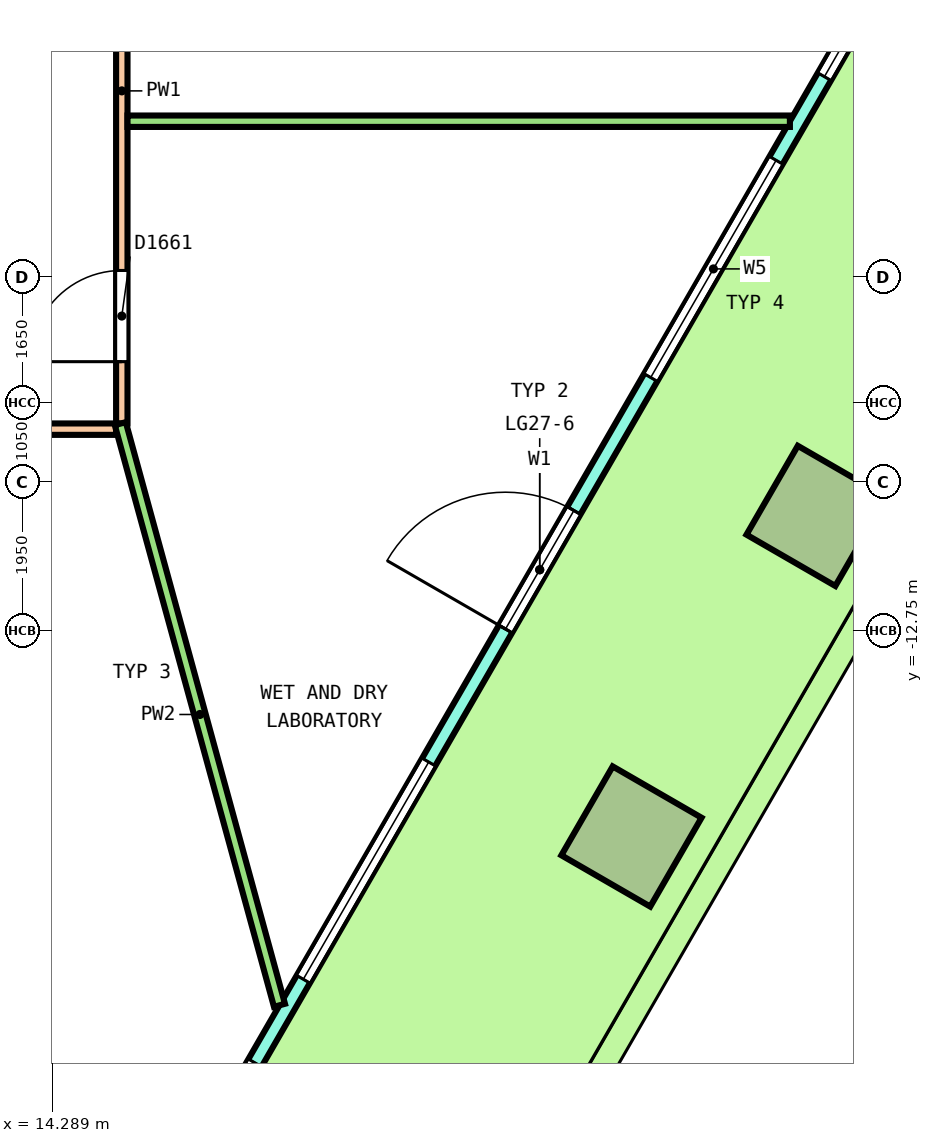
"""IFC4 building model, lengths in metres.
Left out: names, types, materials, properties, quantities, classifications, styles, units other than length and angle.
Written with IfcOpenShell. Run it as: python <this file> out.ifc"""

import sys

from ifc_helpers import new_model, si_unit, direction, frame, frame_2d, origin, origin_2d, place, context, subcontext, project, spatial, polyline, rectangle, outline, extrude, element, fill, save


model = new_model("IFC4")
c1 = context("Model", 3, precision=1e-05, world=origin(), true_north=direction((0.0, 1.0)))
c2 = subcontext(c1, "Body", "Model", "MODEL_VIEW")
j1 = project(units=[si_unit("LENGTHUNIT", "METRE"), si_unit("PLANEANGLEUNIT", "RADIAN")], contexts=[c1])
p1 = place(None, origin())
s1 = spatial("IfcSite", under=j1, at=p1, CompositionType="ELEMENT")
p2 = place(p1, origin())
s2 = spatial("IfcBuilding", under=s1, at=p2, CompositionType="ELEMENT")
p3 = place(p2, frame((0.0, 0.0, 126.4)))
s3 = spatial("IfcBuildingStorey", under=s2, at=p3, CompositionType="ELEMENT", Elevation=126.4)
for number, where, z_axis, x_axis in (
    (1, (21.905, -15.459, 0.0), (0.0, 0.0, 1.0), (0.5, 0.866, 0.0)),
    (2, (24.341, -11.241, 0.0), (0.0, 0.0, 1.0), (0.5, 0.866, 0.0)),
):
    element("IfcColumn", number, at=place(p3, frame(where, z_axis=z_axis, x_axis=x_axis)), inside=s3, PredefinedType="COLUMN", context=c2, shape_type="SweptSolid", body=[
        extrude(rectangle(XDim=1.35, YDim=1.35, at=origin_2d()), origin(), (0.0, 0.0, 1.0), 4.05),
    ])
p4 = place(p3, frame((14.985, -21.845, 0.0), z_axis=(0.0, 0.0, 1.0), x_axis=(0.50000204422, 0.86602422355, 0.0)))
e3 = element("IfcWall", 3, at=p4, inside=s3, PredefinedType="SOLIDWALL", context=c2, shape_type="SweptSolid", body=[
    extrude(outline(polyline([(-0.027, -0.1), (1.014, -0.1), (2.055, -0.1), (3.097, -0.1), (4.138, -0.1), (5.179, -0.1), (6.22, -0.1), (7.261, -0.1), (8.303, -0.1), (9.344, -0.1), (10.385, -0.1), (11.426, -0.1), (12.468, -0.1), (13.509, -0.1), (14.55, -0.1), (15.591, -0.1), (16.632, -0.1), (17.673, -0.1), (18.715, -0.1), (19.756, -0.1), (20.797, -0.1), (21.838, -0.1), (22.879, -0.1), (22.826, 0.1), (21.789, 0.1), (20.753, 0.1), (19.717, 0.1), (18.68, 0.1), (17.644, 0.1), (16.608, 0.1), (15.572, 0.1), (14.535, 0.1), (13.499, 0.1), (12.463, 0.1), (11.426, 0.1), (10.39, 0.1), (9.354, 0.1), (8.317, 0.1), (7.281, 0.1), (6.245, 0.1), (5.208, 0.1), (4.172, 0.1), (3.136, 0.1), (2.099, 0.1), (1.063, 0.1), (0.027, 0.1), (-0.027, -0.1)])), origin(), (0.0, 0.0, 1.0), 4.1),
])
p5 = place(p4, frame((0.635, 0.0, 0.1)))
e4 = element("IfcOpeningElement", 4, at=p5, cuts=e3, PredefinedType="OPENING", context=c2, shape_type="SweptSolid", body=[
    extrude(rectangle(XDim=3.3, YDim=2.9, at=frame_2d((1.65, 1.45))), frame((0.0, 0.11, 0.0), z_axis=(0.0, -1.0, 0.0), x_axis=(1.0, 0.0, 0.0)), (0.0, 0.0, 1.0), 0.22),
])
p6 = place(p4, frame((5.206, 0.0, 0.1)))
e5 = element("IfcOpeningElement", 5, at=p6, cuts=e3, PredefinedType="OPENING", context=c2, shape_type="SweptSolid", body=[
    extrude(rectangle(XDim=3.3, YDim=2.9, at=frame_2d((1.65, 1.45))), frame((0.0, 0.11, 0.0), z_axis=(0.0, -1.0, 0.0), x_axis=(1.0, 0.0, 0.0)), (0.0, 0.0, 1.0), 0.22),
])
p7 = place(p4, frame((10.526, 0.0, 0.0)))
e6 = element("IfcOpeningElement", 6, at=p7, cuts=e3, PredefinedType="OPENING", context=c2, shape_type="SweptSolid", body=[
    extrude(rectangle(XDim=1.8, YDim=2.4, at=frame_2d((0.9, 1.2))), frame((0.0, 0.11, 0.0), z_axis=(0.0, -1.0, 0.0), x_axis=(1.0, 0.0, 0.0)), (0.0, 0.0, 1.0), 0.22),
])
p8 = place(p4, frame((10.526, 0.0, 2.55)))
e7 = element("IfcOpeningElement", 7, at=p8, cuts=e3, PredefinedType="OPENING", context=c2, shape_type="SweptSolid", body=[
    extrude(rectangle(XDim=1.8, YDim=0.45, at=frame_2d((0.9, 0.225))), frame((0.0, 0.11, 0.0), z_axis=(0.0, -1.0, 0.0), x_axis=(1.0, 0.0, 0.0)), (0.0, 0.0, 1.0), 0.22),
])
p9 = place(p4, frame((14.347, 0.0, 0.1)))
e8 = element("IfcOpeningElement", 8, at=p9, cuts=e3, PredefinedType="OPENING", context=c2, shape_type="SweptSolid", body=[
    extrude(rectangle(XDim=3.3, YDim=2.9, at=frame_2d((1.65, 1.45))), frame((0.0, 0.11, 0.0), z_axis=(0.0, -1.0, 0.0), x_axis=(1.0, 0.0, 0.0)), (0.0, 0.0, 1.0), 0.22),
])
p10 = place(p4, frame((18.917, 0.0, 0.1)))
e9 = element("IfcOpeningElement", 9, at=p10, cuts=e3, PredefinedType="OPENING", context=c2, shape_type="SweptSolid", body=[
    extrude(rectangle(XDim=3.3, YDim=2.9, at=frame_2d((1.65, 1.45))), frame((0.0, 0.11, 0.0), z_axis=(0.0, -1.0, 0.0), x_axis=(1.0, 0.0, 0.0)), (0.0, 0.0, 1.0), 0.22),
])
p11 = place(p3, frame((15.2, -10.025, 0.0), z_axis=(0.0, 0.0, 1.0), x_axis=(0.0, 1.0, 0.0)))
e10 = element("IfcWall", 10, at=p11, inside=s3, PredefinedType="PARTITIONING", context=c2, shape_type="SweptSolid", body=[
    extrude(rectangle(XDim=8.75, YDim=0.15, at=frame_2d((4.375, 0.0))), origin(), (0.0, 0.0, 1.0), 3.05),
])
p12 = place(p11, frame((0.813, 0.0, 0.0)))
e11 = element("IfcOpeningElement", 11, at=p12, cuts=e10, PredefinedType="OPENING", context=c2, shape_type="SweptSolid", body=[
    extrude(rectangle(XDim=1.2, YDim=2.1, at=frame_2d((0.6, 1.05))), frame((0.0, 0.085, 0.0), z_axis=(0.0, -1.0, 0.0), x_axis=(1.0, 0.0, 0.0)), (0.0, 0.0, 1.0), 0.17),
])
p13 = place(p3, frame((-15.275, -10.1, 0.0), z_axis=(0.0, 0.0, 1.0), x_axis=(1.0, 0.0, 0.0)))
e12 = element("IfcWall", 12, at=p13, inside=s3, PredefinedType="PARTITIONING", context=c2, shape_type="SweptSolid", body=[
    extrude(rectangle(XDim=30.4, YDim=0.15, at=frame_2d((15.2, 0.0))), origin(), (0.0, 0.0, 1.0), 3.05),
])
p14 = place(p13, frame((1.506, 0.0, 0.0)))
e13 = element("IfcOpeningElement", 13, at=p14, cuts=e12, PredefinedType="OPENING", context=c2, shape_type="SweptSolid", body=[
    extrude(rectangle(XDim=1.0, YDim=2.1, at=frame_2d((0.5, 1.05))), frame((0.0, 0.085, 0.0), z_axis=(0.0, -1.0, 0.0), x_axis=(1.0, 0.0, 0.0)), (0.0, 0.0, 1.0), 0.17),
])
p15 = place(p13, frame((7.84, 0.0, 0.0)))
e14 = element("IfcOpeningElement", 14, at=p15, cuts=e12, PredefinedType="OPENING", context=c2, shape_type="SweptSolid", body=[
    extrude(rectangle(XDim=1.0, YDim=2.1, at=frame_2d((0.5, 1.05))), frame((0.0, 0.085, 0.0), z_axis=(0.0, -1.0, 0.0), x_axis=(1.0, 0.0, 0.0)), (0.0, 0.0, 1.0), 0.17),
])
p16 = place(p13, frame((15.685, 0.0, 0.0)))
e15 = element("IfcOpeningElement", 15, at=p16, cuts=e12, PredefinedType="OPENING", context=c2, shape_type="SweptSolid", body=[
    extrude(rectangle(XDim=1.2, YDim=2.1, at=frame_2d((0.6, 1.05))), frame((0.0, 0.085, 0.0), z_axis=(0.0, -1.0, 0.0), x_axis=(1.0, 0.0, 0.0)), (0.0, 0.0, 1.0), 0.17),
])
p17 = place(p13, frame((23.812, 0.0, 0.0)))
e16 = element("IfcOpeningElement", 16, at=p17, cuts=e12, PredefinedType="OPENING", context=c2, shape_type="SweptSolid", body=[
    extrude(rectangle(XDim=1.2, YDim=2.1, at=frame_2d((0.6, 1.05))), frame((0.0, 0.085, 0.0), z_axis=(0.0, -1.0, 0.0), x_axis=(1.0, 0.0, 0.0)), (0.0, 0.0, 1.0), 0.17),
])
p18 = place(p3, frame((15.18, -10.028, 0.0), z_axis=(0.0, 0.0, 1.0), x_axis=(0.263973985393, -0.964529799973, 0.0)))
e17 = element("IfcWall", 17, at=p18, inside=s3, PredefinedType="PARTITIONING", context=c2, shape_type="SweptSolid", body=[
    extrude(rectangle(XDim=7.934, YDim=0.15, at=frame_2d((3.967, 0.0))), origin(), (0.0, 0.0, 1.0), 3.05),
])
p19 = place(p3, frame((15.275, -6.049, 0.0), z_axis=(0.0, 0.0, 1.0), x_axis=(1.0, 0.0, 0.0)))
e18 = element("IfcWall", 18, at=p19, inside=s3, PredefinedType="PARTITIONING", context=c2, shape_type="SweptSolid", body=[
    extrude(rectangle(XDim=8.715, YDim=0.15, at=frame_2d((4.357, 0.0))), origin(), (0.0, 0.0, 1.0), 3.05),
])
p20 = place(p5, origin())
e19 = element("IfcWindow", 19, at=p20, inside=s3, PartitioningType="SINGLE_PANEL", PredefinedType="WINDOW", context=c2, shape_type="SweptSolid", body=[
    extrude(rectangle(XDim=3.3, YDim=2.9, at=frame_2d((1.65, 1.45))), frame((0.0, 0.03, 0.0), z_axis=(0.0, -1.0, 0.0), x_axis=(1.0, 0.0, 0.0)), (0.0, 0.0, 1.0), 0.06),
])
fill(e4, e19)
p21 = place(p6, origin())
e20 = element("IfcWindow", 20, at=p21, inside=s3, PartitioningType="SINGLE_PANEL", PredefinedType="WINDOW", context=c2, shape_type="SweptSolid", body=[
    extrude(rectangle(XDim=3.3, YDim=2.9, at=frame_2d((1.65, 1.45))), frame((0.0, 0.03, 0.0), z_axis=(0.0, -1.0, 0.0), x_axis=(1.0, 0.0, 0.0)), (0.0, 0.0, 1.0), 0.06),
])
fill(e5, e20)
p22 = place(p7, origin())
e21 = element("IfcDoor", 21, at=p22, inside=s3, OperationType="DOUBLE_DOOR_SINGLE_SWING", PredefinedType="DOOR", context=c2, shape_type="SweptSolid", body=[
    extrude(rectangle(XDim=1.8, YDim=2.4, at=frame_2d((0.9, 1.2))), frame((0.0, 0.025, 0.0), z_axis=(0.0, -1.0, 0.0), x_axis=(1.0, 0.0, 0.0)), (0.0, 0.0, 1.0), 0.05),
])
fill(e6, e21)
p23 = place(p8, origin())
e22 = element("IfcWindow", 22, at=p23, inside=s3, PartitioningType="SINGLE_PANEL", PredefinedType="WINDOW", context=c2, shape_type="SweptSolid", body=[
    extrude(rectangle(XDim=1.8, YDim=0.45, at=frame_2d((0.9, 0.225))), frame((0.0, 0.03, 0.0), z_axis=(0.0, -1.0, 0.0), x_axis=(1.0, 0.0, 0.0)), (0.0, 0.0, 1.0), 0.06),
])
fill(e7, e22)
p24 = place(p9, origin())
e23 = element("IfcWindow", 23, at=p24, inside=s3, PartitioningType="SINGLE_PANEL", PredefinedType="WINDOW", context=c2, shape_type="SweptSolid", body=[
    extrude(rectangle(XDim=3.3, YDim=2.9, at=frame_2d((1.65, 1.45))), frame((0.0, 0.03, 0.0), z_axis=(0.0, -1.0, 0.0), x_axis=(1.0, 0.0, 0.0)), (0.0, 0.0, 1.0), 0.06),
])
fill(e8, e23)
p25 = place(p10, origin())
e24 = element("IfcWindow", 24, at=p25, inside=s3, PartitioningType="SINGLE_PANEL", PredefinedType="WINDOW", context=c2, shape_type="SweptSolid", body=[
    extrude(rectangle(XDim=3.3, YDim=2.9, at=frame_2d((1.65, 1.45))), frame((0.0, 0.03, 0.0), z_axis=(0.0, -1.0, 0.0), x_axis=(1.0, 0.0, 0.0)), (0.0, 0.0, 1.0), 0.06),
])
fill(e9, e24)
p26 = place(p12, origin())
e25 = element("IfcDoor", 25, at=p26, inside=s3, OperationType="DOUBLE_DOOR_SINGLE_SWING", PredefinedType="DOOR", context=c2, shape_type="SweptSolid", body=[
    extrude(rectangle(XDim=1.2, YDim=2.1, at=frame_2d((0.6, 1.05))), frame((0.0, 0.025, 0.0), z_axis=(0.0, -1.0, 0.0), x_axis=(1.0, 0.0, 0.0)), (0.0, 0.0, 1.0), 0.05),
])
fill(e11, e25)
save(model, sys.argv[1])
